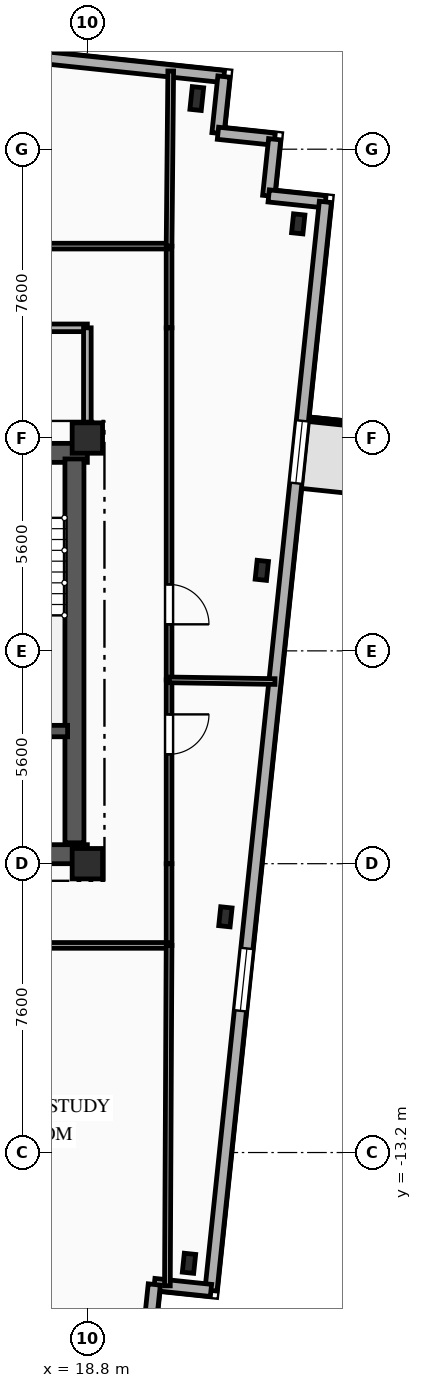
"""IFC4 building model, lengths in metres.
Left out: names, types, materials, properties, quantities, classifications, styles, units other than length and angle.
Written with IfcOpenShell. Run it as: python <this file> out.ifc"""

import sys

from ifc_helpers import new_model, si_unit, direction, frame, frame_2d, origin, origin_2d, place, context, subcontext, project, spatial, rectangle, i_section, extrude, element, fill, save


model = new_model("IFC4")
c1 = context("Model", 3, precision=1e-05, world=origin(), true_north=direction((0.0, 1.0)))
c2 = subcontext(c1, "Body", "Model", "MODEL_VIEW")
j1 = project(units=[si_unit("LENGTHUNIT", "METRE"), si_unit("PLANEANGLEUNIT", "RADIAN")], contexts=[c1])
p1 = place(None, origin())
s1 = spatial("IfcSite", under=j1, at=p1, CompositionType="ELEMENT")
p2 = place(p1, origin())
s2 = spatial("IfcBuilding", under=s1, at=p2, CompositionType="ELEMENT")
p3 = place(p2, frame((0.0, 0.0, 219.85)))
s3 = spatial("IfcBuildingStorey", under=s2, at=p3, CompositionType="ELEMENT", Elevation=219.85)
for number, where, z_axis, x_axis in (
    (1, (18.8, -5.6, 0.0), (0.0, 0.0, 1.0), (1.0, 0.0, 0.0)),
    (2, (18.8, 5.6, 0.0), (0.0, 0.0, 1.0), (1.0, 0.0, 0.0)),
):
    element("IfcColumn", number, at=place(p3, frame(where, z_axis=z_axis, x_axis=x_axis)), inside=s3, PredefinedType="COLUMN", context=c2, shape_type="SweptSolid", body=[
        extrude(rectangle(XDim=0.8, YDim=0.8, at=origin_2d()), origin(), (0.0, 0.0, 1.0), 3.35),
    ])
p4 = place(p3, frame((21.679, 14.532, 0.0), z_axis=(0.0, 0.0, 1.0), x_axis=(0.994521895368, -0.104528463268, 0.0)))
e3 = element("IfcColumn", 3, at=p4, inside=s3, PredefinedType="COLUMN", context=c2, shape_type="SweptSolid", body=[
    extrude(i_section(OverallWidth=0.3, OverallDepth=0.6, WebThickness=0.015, FlangeThickness=0.03, FilletRadius=0.027, at=origin_2d()), origin(), (0.0, 0.0, 1.0), 3.35),
])
for number, where, z_axis, x_axis in (
    (4, (21.474, -16.114, 0.0), (0.0, 0.0, 1.0), (0.995, -0.105, 0.0)),
    (5, (22.433, -6.998, 0.0), (0.0, 0.0, 1.0), (0.995, -0.105, 0.0)),
    (6, (23.391, 2.119, 0.0), (0.0, 0.0, 1.0), (0.995, -0.105, 0.0)),
    (7, (24.349, 11.235, 0.0), (0.0, 0.0, 1.0), (0.995, -0.105, 0.0)),
):
    element("IfcColumn", number, at=place(p3, frame(where, z_axis=z_axis, x_axis=x_axis)), inside=s3, PredefinedType="COLUMN", context=c2, shape_type="SweptSolid", body=[
        extrude(i_section(OverallWidth=0.3, OverallDepth=0.5, WebThickness=0.014, FlangeThickness=0.028, FilletRadius=0.027, at=origin_2d()), origin(), (0.0, 0.0, 1.0), 3.35),
    ])
p5 = place(p3, frame((-23.156, 19.898, 0.0), z_axis=(0.0, 0.0, 1.0), x_axis=(0.994522001802, -0.104527450613, 0.0)))
e8 = element("IfcWall", 8, at=p5, inside=s3, PredefinedType="SOLIDWALL", context=c2, shape_type="SweptSolid", body=[
    extrude(rectangle(XDim=45.8, YDim=0.32, at=frame_2d((22.9, 0.0))), origin(), (0.0, 0.0, 1.0), 3.0),
])
p6 = place(p5, frame((4.9, 0.0, 0.85)))
e9 = element("IfcOpeningElement", 9, at=p6, cuts=e8, PredefinedType="OPENING", context=c2, shape_type="SweptSolid", body=[
    extrude(rectangle(XDim=1.65, YDim=1.85, at=frame_2d((0.825, 0.925))), frame((0.0, 0.17, 0.0), z_axis=(0.0, -1.0, 0.0), x_axis=(1.0, 0.0, 0.0)), (0.0, 0.0, 1.0), 0.34),
])
p7 = place(p5, frame((11.706, 0.0, 0.85)))
e10 = element("IfcOpeningElement", 10, at=p7, cuts=e8, PredefinedType="OPENING", context=c2, shape_type="SweptSolid", body=[
    extrude(rectangle(XDim=1.65, YDim=1.85, at=frame_2d((0.825, 0.925))), frame((0.0, 0.17, 0.0), z_axis=(0.0, -1.0, 0.0), x_axis=(1.0, 0.0, 0.0)), (0.0, 0.0, 1.0), 0.34),
])
p8 = place(p5, frame((23.431, 0.0, 0.85)))
e11 = element("IfcOpeningElement", 11, at=p8, cuts=e8, PredefinedType="OPENING", context=c2, shape_type="SweptSolid", body=[
    extrude(rectangle(XDim=1.5, YDim=1.85, at=frame_2d((0.75, 0.925))), frame((0.0, 0.17, 0.0), z_axis=(0.0, -1.0, 0.0), x_axis=(1.0, 0.0, 0.0)), (0.0, 0.0, 1.0), 0.34),
])
p9 = place(p5, frame((34.628, 0.0, 0.85)))
e12 = element("IfcOpeningElement", 12, at=p9, cuts=e8, PredefinedType="OPENING", context=c2, shape_type="SweptSolid", body=[
    extrude(rectangle(XDim=1.65, YDim=1.85, at=frame_2d((0.825, 0.925))), frame((0.0, 0.17, 0.0), z_axis=(0.0, -1.0, 0.0), x_axis=(1.0, 0.0, 0.0)), (0.0, 0.0, 1.0), 0.34),
])
p10 = place(p3, frame((22.393, 15.111, 0.0), z_axis=(0.0, 0.0, 1.0), x_axis=(-0.104481464157, -0.994526834051, 0.0)))
e13 = element("IfcWall", 13, at=p10, inside=s3, PredefinedType="SOLIDWALL", context=c2, shape_type="SweptSolid", body=[
    extrude(rectangle(XDim=1.5, YDim=0.32, at=frame_2d((0.75, 0.0))), origin(), (0.0, 0.0, 1.0), 3.0),
])
for number, where, z_axis, x_axis in (
    (14, (22.237, 13.619, 0.0), (0.0, 0.0, 1.0), (0.995, -0.104, 0.0)),
    (15, (23.728, 13.462, 0.0), (0.0, 0.0, 1.0), (-0.104, -0.995, 0.0)),
    (16, (23.572, 11.971, 0.0), (0.0, 0.0, 1.0), (0.995, -0.105, 0.0)),
):
    element("IfcWall", number, at=place(p3, frame(where, z_axis=z_axis, x_axis=x_axis)), inside=s3, PredefinedType="SOLIDWALL", context=c2, shape_type="SweptSolid", body=[
        extrude(rectangle(XDim=1.5, YDim=0.32, at=frame_2d((0.75, 0.0))), origin(), (0.0, 0.0, 1.0), 3.0),
    ])
p11 = place(p3, frame((25.063, 11.814, 0.0), z_axis=(0.0, 0.0, 1.0), x_axis=(-0.104523275986, -0.99452244056, 0.0)))
e17 = element("IfcWall", 17, at=p11, inside=s3, PredefinedType="SOLIDWALL", context=c2, shape_type="SweptSolid", body=[
    extrude(rectangle(XDim=28.8, YDim=0.32, at=frame_2d((14.4, 0.0))), origin(), (0.0, 0.0, 1.0), 3.0),
])
p12 = place(p11, frame((5.793, 0.0, 0.85)))
e18 = element("IfcOpeningElement", 18, at=p12, cuts=e17, PredefinedType="OPENING", context=c2, shape_type="SweptSolid", body=[
    extrude(rectangle(XDim=1.65, YDim=1.85, at=frame_2d((0.825, 0.925))), frame((0.0, 0.17, 0.0), z_axis=(0.0, -1.0, 0.0), x_axis=(1.0, 0.0, 0.0)), (0.0, 0.0, 1.0), 0.34),
])
p13 = place(p11, frame((19.752, 0.0, 0.85)))
e19 = element("IfcOpeningElement", 19, at=p13, cuts=e17, PredefinedType="OPENING", context=c2, shape_type="SweptSolid", body=[
    extrude(rectangle(XDim=1.65, YDim=1.85, at=frame_2d((0.825, 0.925))), frame((0.0, 0.17, 0.0), z_axis=(0.0, -1.0, 0.0), x_axis=(1.0, 0.0, 0.0)), (0.0, 0.0, 1.0), 0.34),
])
p14 = place(p3, frame((22.053, -16.828, 0.0), z_axis=(0.0, 0.0, 1.0), x_axis=(-0.994526834051, 0.104481464157, 0.0)))
e20 = element("IfcWall", 20, at=p14, inside=s3, PredefinedType="SOLIDWALL", context=c2, shape_type="SweptSolid", body=[
    extrude(rectangle(XDim=1.5, YDim=0.32, at=frame_2d((0.75, 0.0))), origin(), (0.0, 0.0, 1.0), 3.0),
])
p15 = place(p3, frame((20.561, -16.672, 0.0), z_axis=(0.0, 0.0, 1.0), x_axis=(-0.104498377516, -0.994525057048, 0.0)))
e21 = element("IfcWall", 21, at=p15, inside=s3, PredefinedType="SOLIDWALL", context=c2, shape_type="SweptSolid", body=[
    extrude(rectangle(XDim=1.5, YDim=0.32, at=frame_2d((0.75, 0.0))), origin(), (0.0, 0.0, 1.0), 3.0),
])
p16 = place(p3, frame((18.756, -19.498, 0.0), z_axis=(0.0, 0.0, 1.0), x_axis=(-0.994522060044, 0.104526896475, 0.0)))
e22 = element("IfcWall", 22, at=p16, inside=s3, PredefinedType="SOLIDWALL", context=c2, shape_type="SweptSolid", body=[
    extrude(rectangle(XDim=45.8, YDim=0.32, at=frame_2d((22.9, 0.0))), origin(), (0.0, 0.0, 1.0), 3.0),
])
p17 = place(p16, frame((1.657, 0.0, 0.85)))
e23 = element("IfcOpeningElement", 23, at=p17, cuts=e22, PredefinedType="OPENING", context=c2, shape_type="SweptSolid", body=[
    extrude(rectangle(XDim=1.65, YDim=1.85, at=frame_2d((0.825, 0.925))), frame((0.0, 0.17, 0.0), z_axis=(0.0, -1.0, 0.0), x_axis=(1.0, 0.0, 0.0)), (0.0, 0.0, 1.0), 0.34),
])
p18 = place(p16, frame((6.907, 0.0, 0.85)))
e24 = element("IfcOpeningElement", 24, at=p18, cuts=e22, PredefinedType="OPENING", context=c2, shape_type="SweptSolid", body=[
    extrude(rectangle(XDim=2.2, YDim=1.85, at=frame_2d((1.1, 0.925))), frame((0.0, 0.17, 0.0), z_axis=(0.0, -1.0, 0.0), x_axis=(1.0, 0.0, 0.0)), (0.0, 0.0, 1.0), 0.34),
])
p19 = place(p16, frame((13.953, 0.0, 0.85)))
e25 = element("IfcOpeningElement", 25, at=p19, cuts=e22, PredefinedType="OPENING", context=c2, shape_type="SweptSolid", body=[
    extrude(rectangle(XDim=2.2, YDim=1.85, at=frame_2d((1.1, 0.925))), frame((0.0, 0.17, 0.0), z_axis=(0.0, -1.0, 0.0), x_axis=(1.0, 0.0, 0.0)), (0.0, 0.0, 1.0), 0.34),
])
p20 = place(p16, frame((20.959, 0.0, 0.85)))
e26 = element("IfcOpeningElement", 26, at=p20, cuts=e22, PredefinedType="OPENING", context=c2, shape_type="SweptSolid", body=[
    extrude(rectangle(XDim=2.2, YDim=1.85, at=frame_2d((1.1, 0.925))), frame((0.0, 0.17, 0.0), z_axis=(0.0, -1.0, 0.0), x_axis=(1.0, 0.0, 0.0)), (0.0, 0.0, 1.0), 0.34),
])
p21 = place(p16, frame((27.965, 0.0, 0.85)))
e27 = element("IfcOpeningElement", 27, at=p21, cuts=e22, PredefinedType="OPENING", context=c2, shape_type="SweptSolid", body=[
    extrude(rectangle(XDim=2.2, YDim=1.85, at=frame_2d((1.1, 0.925))), frame((0.0, 0.17, 0.0), z_axis=(0.0, -1.0, 0.0), x_axis=(1.0, 0.0, 0.0)), (0.0, 0.0, 1.0), 0.34),
])
p22 = place(p16, frame((35.487, 0.0, 0.85)))
e28 = element("IfcOpeningElement", 28, at=p22, cuts=e22, PredefinedType="OPENING", context=c2, shape_type="SweptSolid", body=[
    extrude(rectangle(XDim=1.65, YDim=1.85, at=frame_2d((0.825, 0.925))), frame((0.0, 0.17, 0.0), z_axis=(0.0, -1.0, 0.0), x_axis=(1.0, 0.0, 0.0)), (0.0, 0.0, 1.0), 0.34),
])
p23 = place(p16, frame((41.212, 0.0, 0.85)))
e29 = element("IfcOpeningElement", 29, at=p23, cuts=e22, PredefinedType="OPENING", context=c2, shape_type="SweptSolid", body=[
    extrude(rectangle(XDim=1.65, YDim=1.85, at=frame_2d((0.825, 0.925))), frame((0.0, 0.17, 0.0), z_axis=(0.0, -1.0, 0.0), x_axis=(1.0, 0.0, 0.0)), (0.0, 0.0, 1.0), 0.34),
])
p24 = place(p3, frame((9.2, 5.21, 0.0), z_axis=(0.0, 0.0, 1.0), x_axis=(1.0, 0.0, 0.0)))
e30 = element("IfcWall", 30, at=p24, inside=s3, PredefinedType="SHEAR", context=c2, shape_type="SweptSolid", body=[
    extrude(rectangle(XDim=9.6, YDim=0.5, at=frame_2d((4.8, 0.0))), origin(), (0.0, 0.0, 1.0), 3.0),
])
p25 = place(p24, frame((6.95, 0.0, 0.0)))
e31 = element("IfcOpeningElement", 31, at=p25, cuts=e30, PredefinedType="OPENING", context=c2, shape_type="SweptSolid", body=[
    extrude(rectangle(XDim=1.1, YDim=2.15, at=frame_2d((0.55, 1.075))), frame((0.0, 0.26, 0.0), z_axis=(0.0, -1.0, 0.0), x_axis=(1.0, 0.0, 0.0)), (0.0, 0.0, 1.0), 0.52),
])
p26 = place(p24, frame((3.775, 0.0, 0.0)))
e32 = element("IfcOpeningElement", 32, at=p26, cuts=e30, PredefinedType="OPENING", context=c2, shape_type="SweptSolid", body=[
    extrude(rectangle(XDim=1.05, YDim=2.1, at=frame_2d((0.525, 1.05))), frame((0.0, 0.26, 0.0), z_axis=(0.0, -1.0, 0.0), x_axis=(1.0, 0.0, 0.0)), (0.0, 0.0, 1.0), 0.52),
])
p27 = place(p3, frame((9.2, -5.35, 0.0), z_axis=(0.0, 0.0, 1.0), x_axis=(1.0, 0.0, 0.0)))
e33 = element("IfcWall", 33, at=p27, inside=s3, PredefinedType="SHEAR", context=c2, shape_type="SweptSolid", body=[
    extrude(rectangle(XDim=9.6, YDim=0.5, at=frame_2d((4.8, 0.0))), origin(), (0.0, 0.0, 1.0), 3.0),
])
p28 = place(p27, frame((7.65, 0.0, 0.0)))
e34 = element("IfcOpeningElement", 34, at=p28, cuts=e33, PredefinedType="OPENING", context=c2, shape_type="SweptSolid", body=[
    extrude(rectangle(XDim=0.9, YDim=2.1, at=frame_2d((0.45, 1.05))), frame((0.0, 0.26, 0.0), z_axis=(0.0, -1.0, 0.0), x_axis=(1.0, 0.0, 0.0)), (0.0, 0.0, 1.0), 0.52),
])
p29 = place(p3, frame((18.46, -5.05, 0.0), z_axis=(0.0, 0.0, 1.0), x_axis=(0.0, 1.0, 0.0)))
e35 = element("IfcWall", 35, at=p29, inside=s3, PredefinedType="SHEAR", context=c2, shape_type="SweptSolid", body=[
    extrude(rectangle(XDim=10.1, YDim=0.5, at=frame_2d((5.05, 0.0))), origin(), (0.0, 0.0, 1.0), 3.0),
])
p30 = place(p3, frame((15.1, -2.11, 0.0), z_axis=(0.0, 0.0, 1.0), x_axis=(1.0, 0.0, 0.0)))
e36 = element("IfcWall", 36, at=p30, inside=s3, PredefinedType="SHEAR", context=c2, shape_type="SweptSolid", body=[
    extrude(rectangle(XDim=3.18, YDim=0.3, at=frame_2d((1.59, 0.0))), origin(), (0.0, 0.0, 1.0), 3.0),
])
p31 = place(p3, frame((18.8, 8.5, 0.0), z_axis=(0.0, 0.0, 1.0), x_axis=(-1.0, 0.0, 0.0)))
e37 = element("IfcWall", 37, at=p31, inside=s3, PredefinedType="PARTITIONING", context=c2, shape_type="SweptSolid", body=[
    extrude(rectangle(XDim=6.8, YDim=0.2, at=frame_2d((3.4, 0.0))), origin(), (0.0, 0.0, 1.0), 3.0),
])
p32 = place(p31, frame((3.985, 0.0, 0.0)))
e38 = element("IfcOpeningElement", 38, at=p32, cuts=e37, PredefinedType="OPENING", context=c2, shape_type="SweptSolid", body=[
    extrude(rectangle(XDim=1.1, YDim=2.15, at=frame_2d((0.55, 1.075))), frame((0.0, 0.11, 0.0), z_axis=(0.0, -1.0, 0.0), x_axis=(1.0, 0.0, 0.0)), (0.0, 0.0, 1.0), 0.22),
])
p33 = place(p3, frame((18.8, 5.6, 0.0), z_axis=(0.0, 0.0, 1.0), x_axis=(0.0, 1.0, 0.0)))
e39 = element("IfcWall", 39, at=p33, inside=s3, PredefinedType="PARTITIONING", context=c2, shape_type="SweptSolid", body=[
    extrude(rectangle(XDim=2.9, YDim=0.2, at=frame_2d((1.45, 0.0))), origin(), (0.0, 0.0, 1.0), 2.625),
])
p34 = place(p3, frame((20.95, 10.65, 0.0), z_axis=(0.0, 0.0, 1.0), x_axis=(0.0, -1.0, 0.0)))
e40 = element("IfcWall", 40, at=p34, inside=s3, PredefinedType="PARTITIONING", context=c2, shape_type="SweptSolid", body=[
    extrude(rectangle(XDim=2.15, YDim=0.15, at=frame_2d((1.075, 0.0))), origin(), (0.0, 0.0, 1.0), 3.0),
])
p35 = place(p3, frame((6.583, 10.65, 0.0), z_axis=(0.0, 0.0, 1.0), x_axis=(1.0, 0.0, 0.0)))
e41 = element("IfcWall", 41, at=p35, inside=s3, PredefinedType="PARTITIONING", context=c2, shape_type="SweptSolid", body=[
    extrude(rectangle(XDim=14.367, YDim=0.15, at=frame_2d((7.184, 0.0))), origin(), (0.0, 0.0, 1.0), 3.0),
])
p36 = place(p35, frame((9.698, 0.0, 0.0)))
e42 = element("IfcOpeningElement", 42, at=p36, cuts=e41, PredefinedType="OPENING", context=c2, shape_type="SweptSolid", body=[
    extrude(rectangle(XDim=1.05, YDim=2.15, at=frame_2d((0.525, 1.075))), frame((0.0, 0.085, 0.0), z_axis=(0.0, -1.0, 0.0), x_axis=(1.0, 0.0, 0.0)), (0.0, 0.0, 1.0), 0.17),
])
p37 = place(p3, frame((20.95, -5.6, 0.0), z_axis=(0.0, 0.0, 1.0), x_axis=(0.0, -1.0, 0.0)))
e43 = element("IfcWall", 43, at=p37, inside=s3, PredefinedType="PARTITIONING", context=c2, shape_type="SweptSolid", body=[
    extrude(rectangle(XDim=2.15, YDim=0.15, at=frame_2d((1.075, 0.0))), origin(), (0.0, 0.0, 1.0), 3.0),
])
p38 = place(p3, frame((20.95, -7.75, 0.0), z_axis=(0.0, 0.0, 1.0), x_axis=(-1.0, 0.0, 0.0)))
e44 = element("IfcWall", 44, at=p38, inside=s3, PredefinedType="PARTITIONING", context=c2, shape_type="SweptSolid", body=[
    extrude(rectangle(XDim=6.583, YDim=0.15, at=frame_2d((3.292, 0.0))), origin(), (0.0, 0.0, 1.0), 3.0),
])
p39 = place(p38, frame((4.406, 0.0, 0.0)))
e45 = element("IfcOpeningElement", 45, at=p39, cuts=e44, PredefinedType="OPENING", context=c2, shape_type="SweptSolid", body=[
    extrude(rectangle(XDim=1.05, YDim=2.15, at=frame_2d((0.525, 1.075))), frame((0.0, 0.085, 0.0), z_axis=(0.0, -1.0, 0.0), x_axis=(1.0, 0.0, 0.0)), (0.0, 0.0, 1.0), 0.17),
])
p40 = place(p3, frame((20.95, -0.763, 0.0), z_axis=(0.0, 0.0, 1.0), x_axis=(0.0, -1.0, 0.0)))
e46 = element("IfcWall", 46, at=p40, inside=s3, PredefinedType="PARTITIONING", context=c2, shape_type="SweptSolid", body=[
    extrude(rectangle(XDim=4.837, YDim=0.15, at=frame_2d((2.418, 0.0))), origin(), (0.0, 0.0, 1.0), 2.655),
])
p41 = place(p40, frame((0.908, 0.0, 0.0)))
e47 = element("IfcOpeningElement", 47, at=p41, cuts=e46, PredefinedType="OPENING", context=c2, shape_type="SweptSolid", body=[
    extrude(rectangle(XDim=1.05, YDim=2.15, at=frame_2d((0.525, 1.075))), frame((0.0, 0.085, 0.0), z_axis=(0.0, -1.0, 0.0), x_axis=(1.0, 0.0, 0.0)), (0.0, 0.0, 1.0), 0.17),
])
p42 = place(p3, frame((20.95, 8.5, 0.0), z_axis=(0.0, 0.0, 1.0), x_axis=(0.0, -1.0, 0.0)))
e48 = element("IfcWall", 48, at=p42, inside=s3, PredefinedType="PARTITIONING", context=c2, shape_type="SweptSolid", body=[
    extrude(rectangle(XDim=9.263, YDim=0.15, at=frame_2d((4.632, 0.0))), origin(), (0.0, 0.0, 1.0), 2.655),
])
p43 = place(p42, frame((6.751, 0.0, 0.0)))
e49 = element("IfcOpeningElement", 49, at=p43, cuts=e48, PredefinedType="OPENING", context=c2, shape_type="SweptSolid", body=[
    extrude(rectangle(XDim=1.05, YDim=2.15, at=frame_2d((0.525, 1.075))), frame((0.0, 0.085, 0.0), z_axis=(0.0, -1.0, 0.0), x_axis=(1.0, 0.0, 0.0)), (0.0, 0.0, 1.0), 0.17),
])
p44 = place(p3, frame((20.95, -0.763, 0.0), z_axis=(0.0, 0.0, 1.0), x_axis=(0.999875696831, -0.015766765259, 0.0)))
e50 = element("IfcWall", 50, at=p44, inside=s3, PredefinedType="PARTITIONING", context=c2, shape_type="SweptSolid", body=[
    extrude(rectangle(XDim=2.787, YDim=0.15, at=frame_2d((1.394, 0.0))), origin(), (0.0, 0.0, 1.0), 3.0),
])
p45 = place(p3, frame((20.906, -16.708, 0.0), z_axis=(0.0, 0.0, 1.0), x_axis=(0.004905642486, 0.999987967264, 0.0)))
e51 = element("IfcWall", 51, at=p45, inside=s3, PredefinedType="PARTITIONING", context=c2, shape_type="SweptSolid", body=[
    extrude(rectangle(XDim=8.958, YDim=0.15, at=frame_2d((4.479, 0.0))), origin(), (0.0, 0.0, 1.0), 2.625),
])
p46 = place(p3, frame((20.95, 10.65, 0.0), z_axis=(0.0, 0.0, 1.0), x_axis=(0.009535990233, 0.999954531411, 0.0)))
e52 = element("IfcWall", 52, at=p46, inside=s3, PredefinedType="PARTITIONING", context=c2, shape_type="SweptSolid", body=[
    extrude(rectangle(XDim=4.608, YDim=0.15, at=frame_2d((2.304, 0.0))), origin(), (0.0, 0.0, 1.0), 2.625),
])
p47 = place(p12, origin())
e53 = element("IfcWindow", 53, at=p47, inside=s3, PartitioningType="SINGLE_PANEL", PredefinedType="WINDOW", context=c2, shape_type="SweptSolid", body=[
    extrude(rectangle(XDim=1.65, YDim=1.85, at=frame_2d((0.825, 0.925))), frame((0.0, 0.03, 0.0), z_axis=(0.0, -1.0, 0.0), x_axis=(1.0, 0.0, 0.0)), (0.0, 0.0, 1.0), 0.06),
])
fill(e18, e53)
p48 = place(p13, origin())
e54 = element("IfcWindow", 54, at=p48, inside=s3, PartitioningType="SINGLE_PANEL", PredefinedType="WINDOW", context=c2, shape_type="SweptSolid", body=[
    extrude(rectangle(XDim=1.65, YDim=1.85, at=frame_2d((0.825, 0.925))), frame((0.0, 0.03, 0.0), z_axis=(0.0, -1.0, 0.0), x_axis=(1.0, 0.0, 0.0)), (0.0, 0.0, 1.0), 0.06),
])
fill(e19, e54)
p49 = place(p41, origin())
e55 = element("IfcDoor", 55, at=p49, inside=s3, OperationType="SINGLE_SWING_LEFT", PredefinedType="DOOR", context=c2, shape_type="SweptSolid", body=[
    extrude(rectangle(XDim=1.05, YDim=2.15, at=frame_2d((0.525, 1.075))), frame((0.0, 0.025, 0.0), z_axis=(0.0, -1.0, 0.0), x_axis=(1.0, 0.0, 0.0)), (0.0, 0.0, 1.0), 0.05),
])
fill(e47, e55)
p50 = place(p43, origin())
e56 = element("IfcDoor", 56, at=p50, inside=s3, OperationType="SINGLE_SWING_RIGHT", PredefinedType="DOOR", context=c2, shape_type="SweptSolid", body=[
    extrude(rectangle(XDim=1.05, YDim=2.15, at=frame_2d((0.525, 1.075))), frame((0.0, 0.025, 0.0), z_axis=(0.0, -1.0, 0.0), x_axis=(1.0, 0.0, 0.0)), (0.0, 0.0, 1.0), 0.05),
])
fill(e49, e56)
save(model, sys.argv[1])
